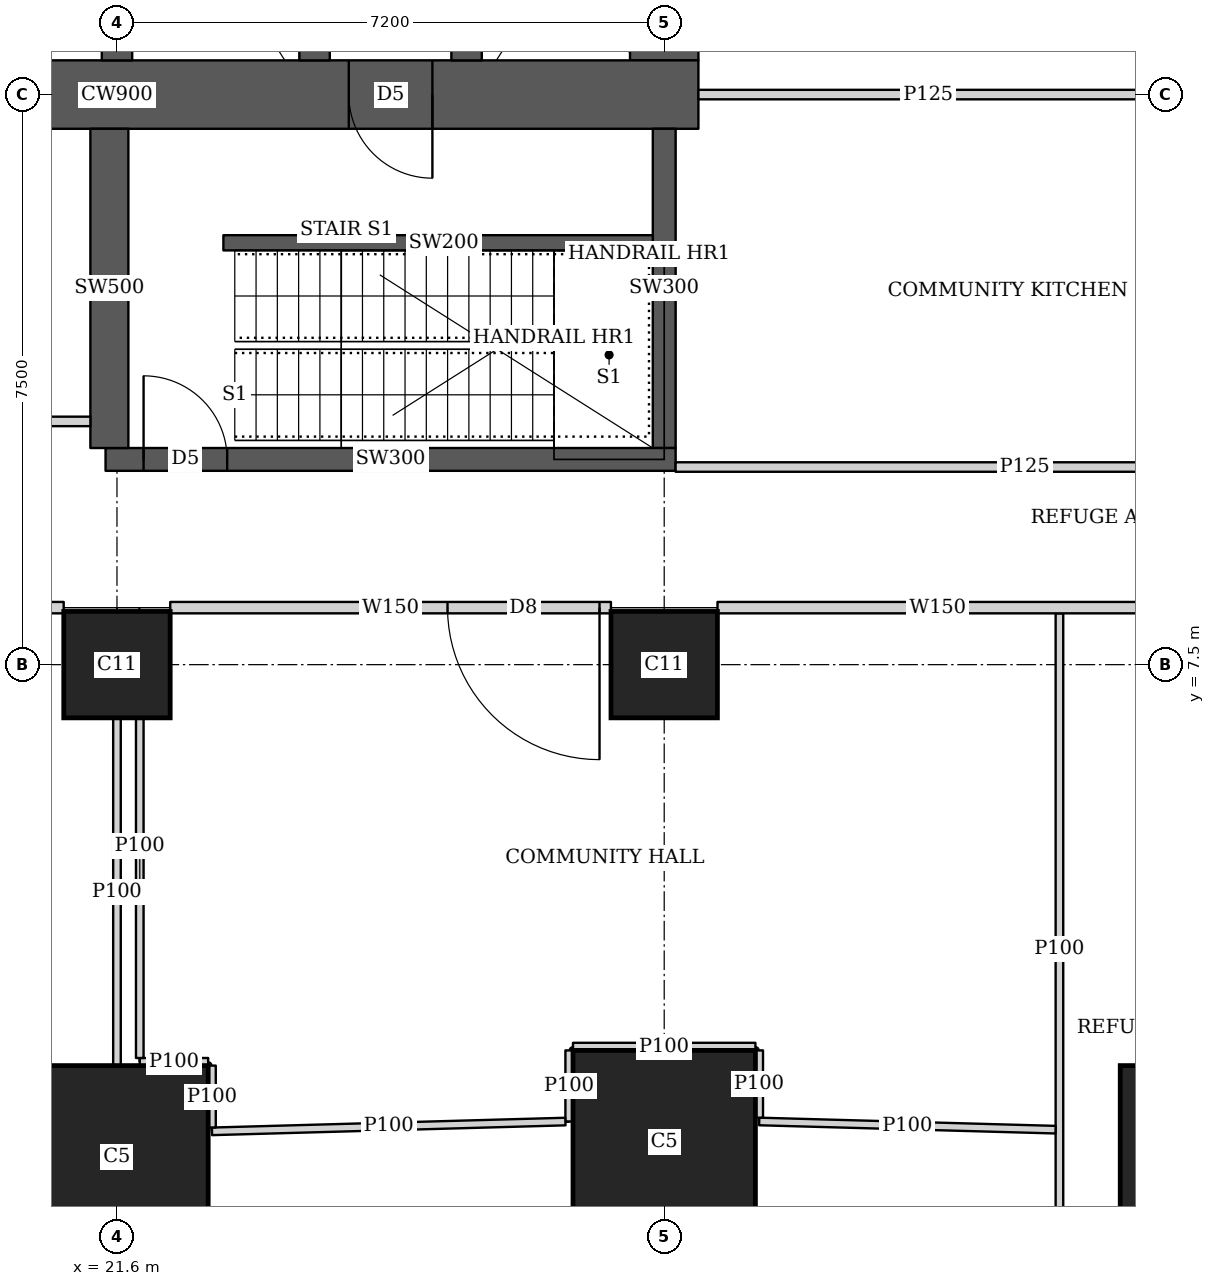
"""IFC4 building model, lengths in metres.
Left out: names, types, materials, properties, quantities, classifications, styles, units other than length and angle.
Written with IfcOpenShell. Run it as: python <this file> out.ifc"""

import sys

from ifc_helpers import new_model, si_unit, direction, frame, frame_2d, origin, origin_2d, place, context, subcontext, project, spatial, rectangle, extrude, element, fill, save


model = new_model("IFC4")
c1 = context("Model", 3, precision=1e-05, world=origin(), true_north=direction((0.0, 1.0)))
c2 = subcontext(c1, "Body", "Model", "MODEL_VIEW")
j1 = project(units=[si_unit("LENGTHUNIT", "METRE"), si_unit("PLANEANGLEUNIT", "RADIAN")], contexts=[c1])
p1 = place(None, origin())
s1 = spatial("IfcSite", under=j1, at=p1, CompositionType="ELEMENT")
p2 = place(p1, origin())
s2 = spatial("IfcBuilding", under=s1, at=p2, CompositionType="ELEMENT")
p3 = place(p2, frame((0.0, 0.0, 246.2)))
s3 = spatial("IfcBuildingStorey", under=s2, at=p3, CompositionType="ELEMENT", Elevation=246.2)
for number, where, z_axis, x_axis in (
    (1, (21.6, 1.025, 0.0), (0.0, 0.0, 1.0), (1.0, 0.0, 0.0)),
    (2, (28.8, 1.225, 0.0), (0.0, 0.0, 1.0), (1.0, 0.0, 0.0)),
    (3, (36.0, 1.025, 0.0), (0.0, 0.0, 1.0), (1.0, 0.0, 0.0)),
):
    element("IfcColumn", number, at=place(p3, frame(where, z_axis=z_axis, x_axis=x_axis)), inside=s3, PredefinedType="COLUMN", context=c2, shape_type="SweptSolid", body=[
        extrude(rectangle(XDim=2.4, YDim=2.4, at=origin_2d()), origin(), (0.0, 0.0, 1.0), 5.4),
    ])
for number, where, z_axis, x_axis in (
    (4, (21.6, 7.5, 0.0), (0.0, 0.0, 1.0), (1.0, 0.0, 0.0)),
    (5, (28.8, 7.5, 0.0), (0.0, 0.0, 1.0), (1.0, 0.0, 0.0)),
):
    element("IfcColumn", number, at=place(p3, frame(where, z_axis=z_axis, x_axis=x_axis)), inside=s3, PredefinedType="COLUMN", context=c2, shape_type="SweptSolid", body=[
        extrude(rectangle(XDim=1.4, YDim=1.4, at=origin_2d()), origin(), (0.0, 0.0, 1.0), 5.4),
    ])
p4 = place(p3, frame((13.95, 15.0, 0.0), z_axis=(0.0, 0.0, 1.0), x_axis=(1.0, 0.0, 0.0)))
e6 = element("IfcWall", 6, at=p4, inside=s3, PredefinedType="SHEAR", context=c2, shape_type="SweptSolid", body=[
    extrude(rectangle(XDim=15.3, YDim=0.9, at=frame_2d((7.65, 0.0))), origin(), (0.0, 0.0, 1.0), 5.4),
])
p5 = place(p4, frame((4.45, 0.0, 0.0)))
e7 = element("IfcOpeningElement", 7, at=p5, cuts=e6, PredefinedType="OPENING", context=c2, shape_type="SweptSolid", body=[
    extrude(rectangle(XDim=1.8, YDim=2.1, at=frame_2d((0.9, 1.05))), frame((0.0, 0.46, 0.0), z_axis=(0.0, -1.0, 0.0), x_axis=(1.0, 0.0, 0.0)), (0.0, 0.0, 1.0), 0.92),
])
p6 = place(p4, frame((10.7, 0.0, 0.0)))
e8 = element("IfcOpeningElement", 8, at=p6, cuts=e6, PredefinedType="OPENING", context=c2, shape_type="SweptSolid", body=[
    extrude(rectangle(XDim=1.1, YDim=2.1, at=frame_2d((0.55, 1.05))), frame((0.0, 0.46, 0.0), z_axis=(0.0, -1.0, 0.0), x_axis=(1.0, 0.0, 0.0)), (0.0, 0.0, 1.0), 0.92),
])
p7 = place(p3, frame((28.8, 15.45, 0.0), z_axis=(0.0, 0.0, 1.0), x_axis=(0.0, 1.0, 0.0)))
e9 = element("IfcWall", 9, at=p7, inside=s3, PredefinedType="SHEAR", context=c2, shape_type="SweptSolid", body=[
    extrude(rectangle(XDim=14.1, YDim=0.9, at=frame_2d((7.05, 0.0))), origin(), (0.0, 0.0, 1.0), 5.4),
])
p8 = place(p3, frame((21.6, 15.45, 0.0), z_axis=(0.0, 0.0, 1.0), x_axis=(0.0, 1.0, 0.0)))
e10 = element("IfcWall", 10, at=p8, inside=s3, PredefinedType="SHEAR", context=c2, shape_type="SweptSolid", body=[
    extrude(rectangle(XDim=14.1, YDim=0.4, at=frame_2d((7.05, 0.0))), origin(), (0.0, 0.0, 1.0), 5.4),
])
p9 = place(p8, frame((0.875, 0.0, 0.0)))
e11 = element("IfcOpeningElement", 11, at=p9, cuts=e10, PredefinedType="OPENING", context=c2, shape_type="SweptSolid", body=[
    extrude(rectangle(XDim=1.1, YDim=2.1, at=frame_2d((0.55, 1.05))), frame((0.0, 0.21, 0.0), z_axis=(0.0, -1.0, 0.0), x_axis=(1.0, 0.0, 0.0)), (0.0, 0.0, 1.0), 0.42),
])
p10 = place(p8, frame((4.625, 0.0, 0.0)))
e12 = element("IfcOpeningElement", 12, at=p10, cuts=e10, PredefinedType="OPENING", context=c2, shape_type="SweptSolid", body=[
    extrude(rectangle(XDim=1.1, YDim=2.1, at=frame_2d((0.55, 1.05))), frame((0.0, 0.21, 0.0), z_axis=(0.0, -1.0, 0.0), x_axis=(1.0, 0.0, 0.0)), (0.0, 0.0, 1.0), 0.42),
])
p11 = place(p8, frame((8.375, 0.0, 0.0)))
e13 = element("IfcOpeningElement", 13, at=p11, cuts=e10, PredefinedType="OPENING", context=c2, shape_type="SweptSolid", body=[
    extrude(rectangle(XDim=1.1, YDim=2.1, at=frame_2d((0.55, 1.05))), frame((0.0, 0.21, 0.0), z_axis=(0.0, -1.0, 0.0), x_axis=(1.0, 0.0, 0.0)), (0.0, 0.0, 1.0), 0.42),
])
p12 = place(p8, frame((12.125, 0.0, 0.0)))
e14 = element("IfcOpeningElement", 14, at=p12, cuts=e10, PredefinedType="OPENING", context=c2, shape_type="SweptSolid", body=[
    extrude(rectangle(XDim=1.1, YDim=2.1, at=frame_2d((0.55, 1.05))), frame((0.0, 0.21, 0.0), z_axis=(0.0, -1.0, 0.0), x_axis=(1.0, 0.0, 0.0)), (0.0, 0.0, 1.0), 0.42),
])
p13 = place(p3, frame((24.2, 15.45, 0.0), z_axis=(0.0, 0.0, 1.0), x_axis=(0.0, 1.0, 0.0)))
e15 = element("IfcWall", 15, at=p13, inside=s3, PredefinedType="SHEAR", context=c2, shape_type="SweptSolid", body=[
    extrude(rectangle(XDim=14.1, YDim=0.4, at=frame_2d((7.05, 0.0))), origin(), (0.0, 0.0, 1.0), 5.4),
])
p14 = place(p3, frame((26.2, 15.45, 0.0), z_axis=(0.0, 0.0, 1.0), x_axis=(0.0, 1.0, 0.0)))
e16 = element("IfcWall", 16, at=p14, inside=s3, PredefinedType="SHEAR", context=c2, shape_type="SweptSolid", body=[
    extrude(rectangle(XDim=3.1, YDim=0.4, at=frame_2d((1.55, 0.0))), origin(), (0.0, 0.0, 1.0), 5.4),
])
p15 = place(p14, frame((0.825, 0.0, 0.0)))
e17 = element("IfcOpeningElement", 17, at=p15, cuts=e16, PredefinedType="OPENING", context=c2, shape_type="SweptSolid", body=[
    extrude(rectangle(XDim=1.2, YDim=2.1, at=frame_2d((0.6, 1.05))), frame((0.0, 0.21, 0.0), z_axis=(0.0, -1.0, 0.0), x_axis=(1.0, 0.0, 0.0)), (0.0, 0.0, 1.0), 0.42),
])
p16 = place(p3, frame((21.45, 10.2, 0.0), z_axis=(0.0, 0.0, 1.0), x_axis=(1.0, 0.0, 0.0)))
e18 = element("IfcWall", 18, at=p16, inside=s3, PredefinedType="SHEAR", context=c2, shape_type="SweptSolid", body=[
    extrude(rectangle(XDim=7.5, YDim=0.3, at=frame_2d((3.75, 0.0))), origin(), (0.0, 0.0, 1.0), 5.4),
])
p17 = place(p16, frame((0.5, 0.0, 0.0)))
e19 = element("IfcOpeningElement", 19, at=p17, cuts=e18, PredefinedType="OPENING", context=c2, shape_type="SweptSolid", body=[
    extrude(rectangle(XDim=1.1, YDim=2.1, at=frame_2d((0.55, 1.05))), frame((0.0, 0.16, 0.0), z_axis=(0.0, -1.0, 0.0), x_axis=(1.0, 0.0, 0.0)), (0.0, 0.0, 1.0), 0.32),
])
p18 = place(p3, frame((21.5, 10.35, 0.0), z_axis=(0.0, 0.0, 1.0), x_axis=(0.0, 1.0, 0.0)))
e20 = element("IfcWall", 20, at=p18, inside=s3, PredefinedType="SHEAR", context=c2, shape_type="SweptSolid", body=[
    extrude(rectangle(XDim=4.2, YDim=0.5, at=frame_2d((2.1, 0.0))), origin(), (0.0, 0.0, 1.0), 5.4),
])
p19 = place(p3, frame((28.8, 10.35, 0.0), z_axis=(0.0, 0.0, 1.0), x_axis=(0.0, 1.0, 0.0)))
e21 = element("IfcWall", 21, at=p19, inside=s3, PredefinedType="SHEAR", context=c2, shape_type="SweptSolid", body=[
    extrude(rectangle(XDim=4.2, YDim=0.3, at=frame_2d((2.1, 0.0))), origin(), (0.0, 0.0, 1.0), 5.4),
])
p20 = place(p3, frame((35.299, 8.25, 0.0), z_axis=(0.0, 0.0, 1.0), x_axis=(-1.0, 0.0, 0.0)))
e22 = element("IfcWall", 22, at=p20, inside=s3, PredefinedType="SOLIDWALL", context=c2, shape_type="SweptSolid", body=[
    extrude(rectangle(XDim=5.798, YDim=0.15, at=frame_2d((2.899, 0.0))), origin(), (0.0, 0.0, 1.0), 2.75),
])
p21 = place(p3, frame((28.099, 8.25, 0.0), z_axis=(0.0, 0.0, 1.0), x_axis=(-1.0, 0.0, 0.0)))
e23 = element("IfcWall", 23, at=p21, inside=s3, PredefinedType="SOLIDWALL", context=c2, shape_type="SweptSolid", body=[
    extrude(rectangle(XDim=5.798, YDim=0.15, at=frame_2d((2.899, 0.0))), origin(), (0.0, 0.0, 1.0), 2.75),
])
p22 = place(p21, frame((0.15, 0.0, 0.0)))
e24 = element("IfcOpeningElement", 24, at=p22, cuts=e23, PredefinedType="OPENING", context=c2, shape_type="SweptSolid", body=[
    extrude(rectangle(XDim=2.0, YDim=2.1, at=frame_2d((1.0, 1.05))), frame((0.0, 0.085, 0.0), z_axis=(0.0, -1.0, 0.0), x_axis=(1.0, 0.0, 0.0)), (0.0, 0.0, 1.0), 0.17),
])
p23 = place(p3, frame((20.899, 8.25, 0.0), z_axis=(0.0, 0.0, 1.0), x_axis=(-1.0, 0.0, 0.0)))
e25 = element("IfcWall", 25, at=p23, inside=s3, PredefinedType="SOLIDWALL", context=c2, shape_type="SweptSolid", body=[
    extrude(rectangle(XDim=4.644, YDim=0.15, at=frame_2d((2.322, 0.0))), origin(), (0.0, 0.0, 1.0), 2.75),
])
p24 = place(p23, frame((2.424, 0.0, 0.0)))
e26 = element("IfcOpeningElement", 26, at=p24, cuts=e25, PredefinedType="OPENING", context=c2, shape_type="SweptSolid", body=[
    extrude(rectangle(XDim=1.8, YDim=2.4, at=frame_2d((0.9, 1.2))), frame((0.0, 0.085, 0.0), z_axis=(0.0, -1.0, 0.0), x_axis=(1.0, 0.0, 0.0)), (0.0, 0.0, 1.0), 0.17),
])
p25 = place(p3, frame((33.382, 45.65, 0.0), z_axis=(0.0, 0.0, 1.0), x_axis=(0.185582712124, -0.982628646519, 0.0)))
e27 = element("IfcWall", 27, at=p25, inside=s3, PredefinedType="SOLIDWALL", context=c2, shape_type="SweptSolid", body=[
    extrude(rectangle(XDim=46.044, YDim=0.15, at=frame_2d((23.022, 0.0))), origin(), (0.0, 0.0, 1.0), 3.35),
])
p26 = place(p25, frame((24.35, 0.0, 0.0)))
e28 = element("IfcOpeningElement", 28, at=p26, cuts=e27, PredefinedType="OPENING", context=c2, shape_type="SweptSolid", body=[
    extrude(rectangle(XDim=1.0, YDim=2.1, at=frame_2d((0.5, 1.05))), frame((0.0, 0.085, 0.0), z_axis=(0.0, -1.0, 0.0), x_axis=(1.0, 0.0, 0.0)), (0.0, 0.0, 1.0), 0.17),
])
p27 = place(p3, frame((21.6, 2.226, 0.0), z_axis=(0.0, 0.0, 1.0), x_axis=(0.0, 1.0, 0.0)))
e29 = element("IfcWall", 29, at=p27, inside=s3, PredefinedType="PARTITIONING", context=c2, shape_type="SweptSolid", body=[
    extrude(rectangle(XDim=4.573, YDim=0.1, at=frame_2d((2.287, 0.0))), origin(), (0.0, 0.0, 1.0), 2.75),
])
p28 = place(p3, frame((34.0, -0.65, 0.0), z_axis=(0.0, 0.0, 1.0), x_axis=(0.0, 1.0, 0.0)))
e30 = element("IfcWall", 30, at=p28, inside=s3, PredefinedType="PARTITIONING", context=c2, shape_type="SweptSolid", body=[
    extrude(rectangle(XDim=8.825, YDim=0.1, at=frame_2d((4.413, 0.0))), origin(), (0.0, 0.0, 1.0), 3.35),
])
p29 = place(p3, frame((13.75, 10.7, 0.0), z_axis=(0.0, 0.0, 1.0), x_axis=(1.0, 0.0, 0.0)))
e31 = element("IfcWall", 31, at=p29, inside=s3, PredefinedType="PARTITIONING", context=c2, shape_type="SweptSolid", body=[
    extrude(rectangle(XDim=7.5, YDim=0.125, at=frame_2d((3.75, 0.0))), origin(), (0.0, 0.0, 1.0), 2.75),
])
p30 = place(p29, frame((4.57, 0.0, 0.0)))
e32 = element("IfcOpeningElement", 32, at=p30, cuts=e31, PredefinedType="OPENING", context=c2, shape_type="SweptSolid", body=[
    extrude(rectangle(XDim=1.8, YDim=2.1, at=frame_2d((0.9, 1.05))), frame((0.0, 0.073, 0.0), z_axis=(0.0, -1.0, 0.0), x_axis=(1.0, 0.0, 0.0)), (0.0, 0.0, 1.0), 0.145),
])
p31 = place(p3, frame((28.95, 10.1, 0.0), z_axis=(0.0, 0.0, 1.0), x_axis=(1.0, 0.0, 0.0)))
e33 = element("IfcWall", 33, at=p31, inside=s3, PredefinedType="PARTITIONING", context=c2, shape_type="SweptSolid", body=[
    extrude(rectangle(XDim=9.188, YDim=0.125, at=frame_2d((4.594, 0.0))), origin(), (0.0, 0.0, 1.0), 2.75),
])
p32 = place(p3, frame((38.202, 10.163, 0.0), z_axis=(0.0, 0.0, 1.0), x_axis=(-0.185610321132, 0.982623431783, 0.0)))
e34 = element("IfcWall", 34, at=p32, inside=s3, PredefinedType="PARTITIONING", context=c2, shape_type="SweptSolid", body=[
    extrude(rectangle(XDim=25.111, YDim=0.125, at=frame_2d((12.556, 0.0))), origin(), (0.0, 0.0, 1.0), 3.55),
])
p33 = place(p32, frame((0.708, 0.0, 0.0)))
e35 = element("IfcOpeningElement", 35, at=p33, cuts=e34, PredefinedType="OPENING", context=c2, shape_type="SweptSolid", body=[
    extrude(rectangle(XDim=1.0, YDim=2.1, at=frame_2d((0.5, 1.05))), frame((0.0, 0.073, 0.0), z_axis=(0.0, -1.0, 0.0), x_axis=(1.0, 0.0, 0.0)), (0.0, 0.0, 1.0), 0.145),
])
p34 = place(p32, frame((5.9, 0.0, 0.0)))
e36 = element("IfcOpeningElement", 36, at=p34, cuts=e34, PredefinedType="OPENING", context=c2, shape_type="SweptSolid", body=[
    extrude(rectangle(XDim=1.0, YDim=2.1, at=frame_2d((0.5, 1.05))), frame((0.0, 0.073, 0.0), z_axis=(0.0, -1.0, 0.0), x_axis=(1.0, 0.0, 0.0)), (0.0, 0.0, 1.0), 0.145),
])
p35 = place(p32, frame((21.15, 0.0, 0.0)))
e37 = element("IfcOpeningElement", 37, at=p35, cuts=e34, PredefinedType="OPENING", context=c2, shape_type="SweptSolid", body=[
    extrude(rectangle(XDim=1.0, YDim=2.1, at=frame_2d((0.5, 1.05))), frame((0.0, 0.073, 0.0), z_axis=(0.0, -1.0, 0.0), x_axis=(1.0, 0.0, 0.0)), (0.0, 0.0, 1.0), 0.145),
])
p36 = place(p32, frame((13.378, 0.0, 0.0)))
e38 = element("IfcOpeningElement", 38, at=p36, cuts=e34, PredefinedType="OPENING", context=c2, shape_type="SweptSolid", body=[
    extrude(rectangle(XDim=1.0, YDim=2.1, at=frame_2d((0.5, 1.05))), frame((0.0, 0.073, 0.0), z_axis=(0.0, -1.0, 0.0), x_axis=(1.0, 0.0, 0.0)), (0.0, 0.0, 1.0), 0.145),
])
p37 = place(p32, frame((15.973, 0.0, 0.0)))
e39 = element("IfcOpeningElement", 39, at=p37, cuts=e34, PredefinedType="OPENING", context=c2, shape_type="SweptSolid", body=[
    extrude(rectangle(XDim=1.0, YDim=2.1, at=frame_2d((0.5, 1.05))), frame((0.0, 0.073, 0.0), z_axis=(0.0, -1.0, 0.0), x_axis=(1.0, 0.0, 0.0)), (0.0, 0.0, 1.0), 0.145),
])
p38 = place(p32, frame((18.467, 0.0, 0.0)))
e40 = element("IfcOpeningElement", 40, at=p38, cuts=e34, PredefinedType="OPENING", context=c2, shape_type="SweptSolid", body=[
    extrude(rectangle(XDim=1.0, YDim=2.1, at=frame_2d((0.5, 1.05))), frame((0.0, 0.073, 0.0), z_axis=(0.0, -1.0, 0.0), x_axis=(1.0, 0.0, 0.0)), (0.0, 0.0, 1.0), 0.145),
])
p39 = place(p3, frame((29.25, 15.0, 0.0), z_axis=(0.0, 0.0, 1.0), x_axis=(1.0, 0.0, 0.0)))
e41 = element("IfcWall", 41, at=p39, inside=s3, PredefinedType="PARTITIONING", context=c2, shape_type="SweptSolid", body=[
    extrude(rectangle(XDim=6.049, YDim=0.125, at=frame_2d((3.024, 0.0))), origin(), (0.0, 0.0, 1.0), 3.55),
])
p40 = place(p3, frame((33.949, 1.382, 0.0), z_axis=(0.0, 0.0, 1.0), x_axis=(-0.999617214664, 0.027666299867, 0.0)))
e42 = element("IfcWall", 42, at=p40, inside=s3, PredefinedType="PARTITIONING", context=c2, shape_type="SweptSolid", body=[
    extrude(rectangle(XDim=3.9, YDim=0.1, at=frame_2d((1.95, 0.0))), origin(), (0.0, 0.0, 1.0), 3.35),
])
p41 = place(p3, frame((30.05, 1.54, 0.0), z_axis=(0.0, 0.0, 1.0), x_axis=(0.0, 1.0, 0.0)))
e43 = element("IfcWall", 43, at=p41, inside=s3, PredefinedType="PARTITIONING", context=c2, shape_type="SweptSolid", body=[
    extrude(rectangle(XDim=0.885, YDim=0.1, at=frame_2d((0.442, 0.0))), origin(), (0.0, 0.0, 1.0), 3.35),
])
p42 = place(p3, frame((30.0, 2.475, 0.0), z_axis=(0.0, 0.0, 1.0), x_axis=(-1.0, 0.0, 0.0)))
e44 = element("IfcWall", 44, at=p42, inside=s3, PredefinedType="PARTITIONING", context=c2, shape_type="SweptSolid", body=[
    extrude(rectangle(XDim=2.4, YDim=0.1, at=frame_2d((1.2, 0.0))), origin(), (0.0, 0.0, 1.0), 3.55),
])
p43 = place(p3, frame((27.55, 2.425, 0.0), z_axis=(0.0, 0.0, 1.0), x_axis=(0.0, -1.0, 0.0)))
e45 = element("IfcWall", 45, at=p43, inside=s3, PredefinedType="PARTITIONING", context=c2, shape_type="SweptSolid", body=[
    extrude(rectangle(XDim=0.935, YDim=0.1, at=frame_2d((0.468, 0.0))), origin(), (0.0, 0.0, 1.0), 3.35),
])
p44 = place(p3, frame((27.5, 1.489, 0.0), z_axis=(0.0, 0.0, 1.0), x_axis=(-0.999615956825, -0.027711709819, 0.0)))
e46 = element("IfcWall", 46, at=p44, inside=s3, PredefinedType="PARTITIONING", context=c2, shape_type="SweptSolid", body=[
    extrude(rectangle(XDim=4.652, YDim=0.1, at=frame_2d((2.326, 0.0))), origin(), (0.0, 0.0, 1.0), 3.35),
])
p45 = place(p3, frame((22.85, 1.411, 0.0), z_axis=(0.0, 0.0, 1.0), x_axis=(0.0, 1.0, 0.0)))
e47 = element("IfcWall", 47, at=p45, inside=s3, PredefinedType="PARTITIONING", context=c2, shape_type="SweptSolid", body=[
    extrude(rectangle(XDim=0.814, YDim=0.1, at=frame_2d((0.407, 0.0))), origin(), (0.0, 0.0, 1.0), 3.35),
])
p46 = place(p3, frame((22.8, 2.275, 0.0), z_axis=(0.0, 0.0, 1.0), x_axis=(-1.0, 0.0, 0.0)))
e48 = element("IfcWall", 48, at=p46, inside=s3, PredefinedType="PARTITIONING", context=c2, shape_type="SweptSolid", body=[
    extrude(rectangle(XDim=0.9, YDim=0.1, at=frame_2d((0.45, 0.0))), origin(), (0.0, 0.0, 1.0), 3.35),
])
p47 = place(p3, frame((21.9, 2.325, 0.0), z_axis=(0.0, 0.0, 1.0), x_axis=(0.0, 1.0, 0.0)))
e49 = element("IfcWall", 49, at=p47, inside=s3, PredefinedType="PARTITIONING", context=c2, shape_type="SweptSolid", body=[
    extrude(rectangle(XDim=4.474, YDim=0.1, at=frame_2d((2.237, 0.0))), origin(), (0.0, 0.0, 1.0), 2.75),
])
p48 = place(p3, frame((23.0, 13.05, 0.0), z_axis=(0.0, 0.0, 1.0), x_axis=(1.0, 0.0, 0.0)))
e50 = element("IfcWall", 50, at=p48, inside=s3, PredefinedType="SHEAR", context=c2, shape_type="SweptSolid", body=[
    extrude(rectangle(XDim=5.8, YDim=0.2, at=frame_2d((2.9, 0.0))), origin(), (0.0, 0.0, 1.0), 5.4),
])
p49 = place(p22, origin())
e51 = element("IfcDoor", 51, at=p49, inside=s3, OperationType="DOUBLE_DOOR_SINGLE_SWING", PredefinedType="DOOR", context=c2, shape_type="SweptSolid", body=[
    extrude(rectangle(XDim=2.0, YDim=2.1, at=frame_2d((1.0, 1.05))), frame((0.0, 0.025, 0.0), z_axis=(0.0, -1.0, 0.0), x_axis=(1.0, 0.0, 0.0)), (0.0, 0.0, 1.0), 0.05),
])
fill(e24, e51)
p50 = place(p6, origin())
e52 = element("IfcDoor", 52, at=p50, inside=s3, OperationType="SINGLE_SWING_LEFT", PredefinedType="DOOR", context=c2, shape_type="SweptSolid", body=[
    extrude(rectangle(XDim=1.1, YDim=2.1, at=frame_2d((0.55, 1.05))), frame((0.0, 0.025, 0.0), z_axis=(0.0, -1.0, 0.0), x_axis=(1.0, 0.0, 0.0)), (0.0, 0.0, 1.0), 0.05),
])
fill(e8, e52)
p51 = place(p17, origin())
e53 = element("IfcDoor", 53, at=p51, inside=s3, OperationType="SINGLE_SWING_LEFT", PredefinedType="DOOR", context=c2, shape_type="SweptSolid", body=[
    extrude(rectangle(XDim=1.1, YDim=2.1, at=frame_2d((0.55, 1.05))), frame((0.0, 0.025, 0.0), z_axis=(0.0, -1.0, 0.0), x_axis=(1.0, 0.0, 0.0)), (0.0, 0.0, 1.0), 0.05),
])
fill(e19, e53)
save(model, sys.argv[1])
